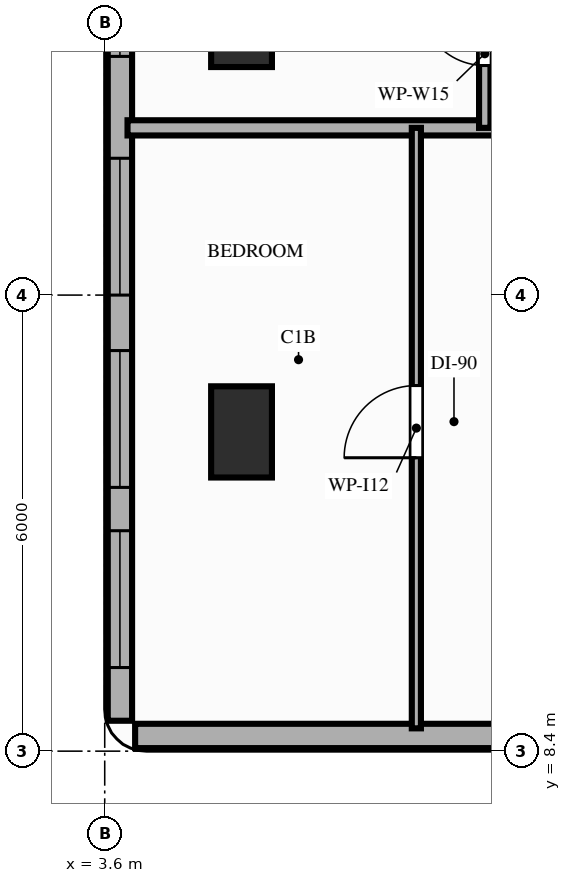
"""IFC4 building model, lengths in metres.
Left out: names, types, materials, properties, quantities, classifications, styles, units other than length and angle.
Written with IfcOpenShell. Run it as: python <this file> out.ifc"""

import sys

from ifc_helpers import new_model, si_unit, direction, frame, frame_2d, origin, origin_2d, place, context, subcontext, project, spatial, rectangle, extrude, element, fill, save


model = new_model("IFC4")
c1 = context("Model", 3, precision=1e-05, world=origin(), true_north=direction((0.0, 1.0)))
c2 = subcontext(c1, "Body", "Model", "MODEL_VIEW")
j1 = project(units=[si_unit("LENGTHUNIT", "METRE"), si_unit("PLANEANGLEUNIT", "RADIAN")], contexts=[c1])
p1 = place(None, origin())
s1 = spatial("IfcSite", under=j1, at=p1, CompositionType="ELEMENT")
p2 = place(p1, origin())
s2 = spatial("IfcBuilding", under=s1, at=p2, CompositionType="ELEMENT")
p3 = place(p2, frame((0.0, 0.0, 93.0)))
s3 = spatial("IfcBuildingStorey", under=s2, at=p3, CompositionType="ELEMENT", Elevation=93.0)
for number, where, z_axis, x_axis in (
    (1, (5.4, 12.6, 0.0), (0.0, 0.0, 1.0), (1.0, 0.0, 0.0)),
    (2, (5.4, 18.0, 0.0), (0.0, 0.0, 1.0), (1.0, 0.0, 0.0)),
):
    element("IfcColumn", number, at=place(p3, frame(where, z_axis=z_axis, x_axis=x_axis)), inside=s3, PredefinedType="COLUMN", context=c2, shape_type="SweptSolid", body=[
        extrude(rectangle(XDim=0.8, YDim=1.2, at=origin_2d()), origin(), (0.0, 0.0, 1.0), 3.2),
    ])
p4 = place(p3, frame((4.0, 8.6, 0.0), z_axis=(0.0, 0.0, 1.0), x_axis=(1.0, 0.0, 0.0)))
e3 = element("IfcWall", 3, at=p4, inside=s3, PredefinedType="STANDARD", context=c2, shape_type="SweptSolid", body=[
    extrude(rectangle(XDim=15.8, YDim=0.32, at=frame_2d((7.9, 0.0))), origin(), (0.0, 0.0, 1.0), 3.02),
])
p5 = place(p4, frame((6.85, 0.0, 0.85)))
e4 = element("IfcOpeningElement", 4, at=p5, cuts=e3, PredefinedType="OPENING", context=c2, shape_type="SweptSolid", body=[
    extrude(rectangle(XDim=1.8, YDim=1.75, at=frame_2d((0.9, 0.875))), frame((0.0, 0.17, 0.0), z_axis=(0.0, -1.0, 0.0), x_axis=(1.0, 0.0, 0.0)), (0.0, 0.0, 1.0), 0.34),
])
p6 = place(p3, frame((3.8, 42.1, 0.0), z_axis=(0.0, 0.0, 1.0), x_axis=(0.0, -1.0, 0.0)))
e5 = element("IfcWall", 5, at=p6, inside=s3, PredefinedType="STANDARD", context=c2, shape_type="SweptSolid", body=[
    extrude(rectangle(XDim=33.3, YDim=0.32, at=frame_2d((16.65, 0.0))), origin(), (0.0, 0.0, 1.0), 2.7),
])
p7 = place(p6, frame((22.76, 0.0, 0.85)))
e6 = element("IfcOpeningElement", 6, at=p7, cuts=e5, PredefinedType="OPENING", context=c2, shape_type="SweptSolid", body=[
    extrude(rectangle(XDim=1.8, YDim=1.6, at=frame_2d((0.9, 0.8))), frame((0.0, 0.17, 0.0), z_axis=(0.0, -1.0, 0.0), x_axis=(1.0, 0.0, 0.0)), (0.0, 0.0, 1.0), 0.34),
])
p8 = place(p6, frame((18.56, 0.0, 0.85)))
e7 = element("IfcOpeningElement", 7, at=p8, cuts=e5, PredefinedType="OPENING", context=c2, shape_type="SweptSolid", body=[
    extrude(rectangle(XDim=1.8, YDim=1.6, at=frame_2d((0.9, 0.8))), frame((0.0, 0.17, 0.0), z_axis=(0.0, -1.0, 0.0), x_axis=(1.0, 0.0, 0.0)), (0.0, 0.0, 1.0), 0.34),
])
p9 = place(p6, frame((14.65, 0.0, 0.85)))
e8 = element("IfcOpeningElement", 8, at=p9, cuts=e5, PredefinedType="OPENING", context=c2, shape_type="SweptSolid", body=[
    extrude(rectangle(XDim=1.8, YDim=1.6, at=frame_2d((0.9, 0.8))), frame((0.0, 0.17, 0.0), z_axis=(0.0, -1.0, 0.0), x_axis=(1.0, 0.0, 0.0)), (0.0, 0.0, 1.0), 0.34),
])
p10 = place(p6, frame((28.43, 0.0, 0.85)))
e9 = element("IfcOpeningElement", 9, at=p10, cuts=e5, PredefinedType="OPENING", context=c2, shape_type="SweptSolid", body=[
    extrude(rectangle(XDim=1.8, YDim=1.6, at=frame_2d((0.9, 0.8))), frame((0.0, 0.17, 0.0), z_axis=(0.0, -1.0, 0.0), x_axis=(1.0, 0.0, 0.0)), (0.0, 0.0, 1.0), 0.34),
])
p11 = place(p6, frame((30.8, 0.0, 0.85)))
e10 = element("IfcOpeningElement", 10, at=p11, cuts=e5, PredefinedType="OPENING", context=c2, shape_type="SweptSolid", body=[
    extrude(rectangle(XDim=1.8, YDim=1.6, at=frame_2d((0.9, 0.8))), frame((0.0, 0.17, 0.0), z_axis=(0.0, -1.0, 0.0), x_axis=(1.0, 0.0, 0.0)), (0.0, 0.0, 1.0), 0.34),
])
p12 = place(p6, frame((25.9, 0.0, 0.85)))
e11 = element("IfcOpeningElement", 11, at=p12, cuts=e5, PredefinedType="OPENING", context=c2, shape_type="SweptSolid", body=[
    extrude(rectangle(XDim=1.8, YDim=1.6, at=frame_2d((0.9, 0.8))), frame((0.0, 0.17, 0.0), z_axis=(0.0, -1.0, 0.0), x_axis=(1.0, 0.0, 0.0)), (0.0, 0.0, 1.0), 0.34),
])
p13 = place(p6, frame((9.9, 0.0, 0.85)))
e12 = element("IfcOpeningElement", 12, at=p13, cuts=e5, PredefinedType="OPENING", context=c2, shape_type="SweptSolid", body=[
    extrude(rectangle(XDim=1.8, YDim=1.6, at=frame_2d((0.9, 0.8))), frame((0.0, 0.17, 0.0), z_axis=(0.0, -1.0, 0.0), x_axis=(1.0, 0.0, 0.0)), (0.0, 0.0, 1.0), 0.34),
])
p14 = place(p6, frame((3.8, 0.0, 0.85)))
e13 = element("IfcOpeningElement", 13, at=p14, cuts=e5, PredefinedType="OPENING", context=c2, shape_type="SweptSolid", body=[
    extrude(rectangle(XDim=1.8, YDim=1.6, at=frame_2d((0.9, 0.8))), frame((0.0, 0.17, 0.0), z_axis=(0.0, -1.0, 0.0), x_axis=(1.0, 0.0, 0.0)), (0.0, 0.0, 1.0), 0.34),
])
p15 = place(p3, frame((3.9, 16.6, 0.0), z_axis=(0.0, 0.0, 1.0), x_axis=(1.0, 0.0, 0.0)))
e14 = element("IfcWall", 14, at=p15, inside=s3, PredefinedType="PARTITIONING", context=c2, shape_type="SweptSolid", body=[
    extrude(rectangle(XDim=16.0, YDim=0.2, at=frame_2d((8.0, 0.0))), origin(), (0.0, 0.0, 1.0), 2.41),
])
p16 = place(p15, frame((7.8, 0.0, 0.0)))
e15 = element("IfcOpeningElement", 15, at=p16, cuts=e14, PredefinedType="OPENING", context=c2, shape_type="SweptSolid", body=[
    extrude(rectangle(XDim=0.95, YDim=2.15, at=frame_2d((0.475, 1.075))), frame((0.0, 0.11, 0.0), z_axis=(0.0, -1.0, 0.0), x_axis=(1.0, 0.0, 0.0)), (0.0, 0.0, 1.0), 0.22),
])
p17 = place(p3, frame((8.6, 16.6, 0.0), z_axis=(0.0, 0.0, 1.0), x_axis=(0.0, 1.0, 0.0)))
e16 = element("IfcWall", 16, at=p17, inside=s3, PredefinedType="PARTITIONING", context=c2, shape_type="SweptSolid", body=[
    extrude(rectangle(XDim=1.95, YDim=0.15, at=frame_2d((0.975, 0.0))), origin(), (0.0, 0.0, 1.0), 2.41),
])
p18 = place(p17, frame((0.82, 0.0, 0.0)))
e17 = element("IfcOpeningElement", 17, at=p18, cuts=e16, PredefinedType="OPENING", context=c2, shape_type="SweptSolid", body=[
    extrude(rectangle(XDim=0.85, YDim=2.1, at=frame_2d((0.425, 1.05))), frame((0.0, 0.085, 0.0), z_axis=(0.0, -1.0, 0.0), x_axis=(1.0, 0.0, 0.0)), (0.0, 0.0, 1.0), 0.17),
])
p19 = place(p3, frame((7.7, 8.7, 0.0), z_axis=(0.0, 0.0, 1.0), x_axis=(0.0, 1.0, 0.0)))
e18 = element("IfcWall", 18, at=p19, inside=s3, PredefinedType="PARTITIONING", context=c2, shape_type="SweptSolid", body=[
    extrude(rectangle(XDim=7.9, YDim=0.12, at=frame_2d((3.95, 0.0))), origin(), (0.0, 0.0, 1.0), 2.41),
])
p20 = place(p19, frame((3.56, 0.0, 0.0)))
e19 = element("IfcOpeningElement", 19, at=p20, cuts=e18, PredefinedType="OPENING", context=c2, shape_type="SweptSolid", body=[
    extrude(rectangle(XDim=0.95, YDim=2.15, at=frame_2d((0.475, 1.075))), frame((0.0, 0.07, 0.0), z_axis=(0.0, -1.0, 0.0), x_axis=(1.0, 0.0, 0.0)), (0.0, 0.0, 1.0), 0.14),
])
p21 = place(p7, origin())
e20 = element("IfcWindow", 20, at=p21, inside=s3, PartitioningType="SINGLE_PANEL", PredefinedType="WINDOW", context=c2, shape_type="SweptSolid", body=[
    extrude(rectangle(XDim=1.8, YDim=1.6, at=frame_2d((0.9, 0.8))), frame((0.0, 0.03, 0.0), z_axis=(0.0, -1.0, 0.0), x_axis=(1.0, 0.0, 0.0)), (0.0, 0.0, 1.0), 0.06),
])
fill(e6, e20)
p22 = place(p10, origin())
e21 = element("IfcWindow", 21, at=p22, inside=s3, PartitioningType="SINGLE_PANEL", PredefinedType="WINDOW", context=c2, shape_type="SweptSolid", body=[
    extrude(rectangle(XDim=1.8, YDim=1.6, at=frame_2d((0.9, 0.8))), frame((0.0, 0.03, 0.0), z_axis=(0.0, -1.0, 0.0), x_axis=(1.0, 0.0, 0.0)), (0.0, 0.0, 1.0), 0.06),
])
fill(e9, e21)
p23 = place(p11, origin())
e22 = element("IfcWindow", 22, at=p23, inside=s3, PartitioningType="SINGLE_PANEL", PredefinedType="WINDOW", context=c2, shape_type="SweptSolid", body=[
    extrude(rectangle(XDim=1.8, YDim=1.6, at=frame_2d((0.9, 0.8))), frame((0.0, 0.03, 0.0), z_axis=(0.0, -1.0, 0.0), x_axis=(1.0, 0.0, 0.0)), (0.0, 0.0, 1.0), 0.06),
])
fill(e10, e22)
p24 = place(p12, origin())
e23 = element("IfcWindow", 23, at=p24, inside=s3, PartitioningType="SINGLE_PANEL", PredefinedType="WINDOW", context=c2, shape_type="SweptSolid", body=[
    extrude(rectangle(XDim=1.8, YDim=1.6, at=frame_2d((0.9, 0.8))), frame((0.0, 0.03, 0.0), z_axis=(0.0, -1.0, 0.0), x_axis=(1.0, 0.0, 0.0)), (0.0, 0.0, 1.0), 0.06),
])
fill(e11, e23)
p25 = place(p18, origin())
e24 = element("IfcDoor", 24, at=p25, inside=s3, OperationType="SINGLE_SWING_RIGHT", PredefinedType="DOOR", context=c2, shape_type="SweptSolid", body=[
    extrude(rectangle(XDim=0.85, YDim=2.1, at=frame_2d((0.425, 1.05))), frame((0.0, 0.025, 0.0), z_axis=(0.0, -1.0, 0.0), x_axis=(1.0, 0.0, 0.0)), (0.0, 0.0, 1.0), 0.05),
])
fill(e17, e24)
p26 = place(p20, origin())
e25 = element("IfcDoor", 25, at=p26, inside=s3, OperationType="SINGLE_SWING_LEFT", PredefinedType="DOOR", context=c2, shape_type="SweptSolid", body=[
    extrude(rectangle(XDim=0.95, YDim=2.15, at=frame_2d((0.475, 1.075))), frame((0.0, 0.025, 0.0), z_axis=(0.0, -1.0, 0.0), x_axis=(1.0, 0.0, 0.0)), (0.0, 0.0, 1.0), 0.05),
])
fill(e19, e25)
save(model, sys.argv[1])
